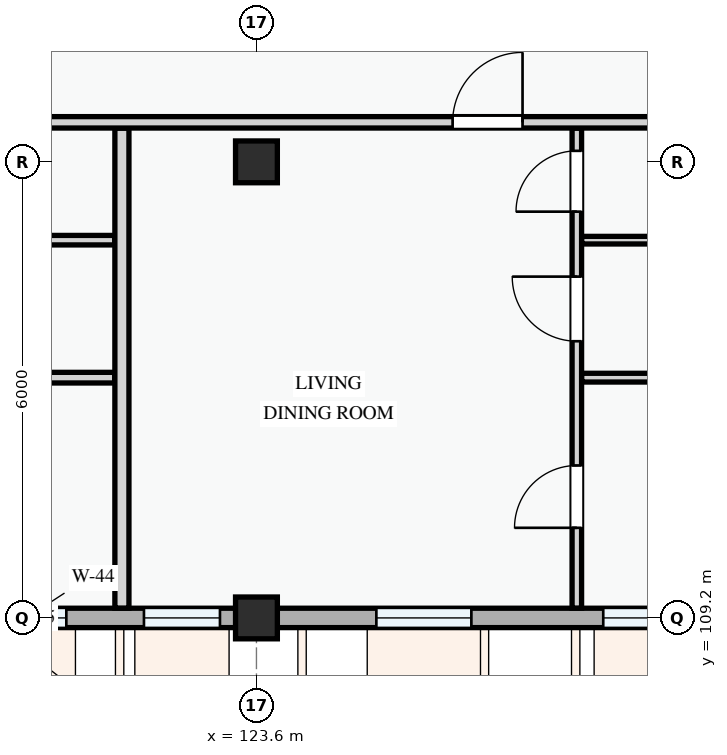
"""IFC4 building model, lengths in metres.
Left out: names, types, materials, properties, quantities, classifications, styles, units other than length and angle.
Written with IfcOpenShell. Run it as: python <this file> out.ifc"""

import sys

from ifc_helpers import new_model, si_unit, direction, frame, frame_2d, origin, origin_2d, place, context, subcontext, project, spatial, rectangle, extrude, element, fill, save


model = new_model("IFC4")
c1 = context("Model", 3, precision=1e-05, world=origin(), true_north=direction((0.0, 1.0)))
c2 = subcontext(c1, "Body", "Model", "MODEL_VIEW")
j1 = project(units=[si_unit("LENGTHUNIT", "METRE"), si_unit("PLANEANGLEUNIT", "RADIAN")], contexts=[c1])
p1 = place(None, origin())
s1 = spatial("IfcSite", under=j1, at=p1, CompositionType="ELEMENT")
p2 = place(p1, origin())
s2 = spatial("IfcBuilding", under=s1, at=p2, CompositionType="ELEMENT")
p3 = place(p2, frame((0.0, 0.0, 34.5)))
s3 = spatial("IfcBuildingStorey", under=s2, at=p3, CompositionType="ELEMENT", Elevation=34.5)
for number, where, z_axis, x_axis in (
    (1, (123.6, 109.2, 0.0), (0.0, 0.0, 1.0), (1.0, 0.0, 0.0)),
    (2, (123.6, 115.2, 0.0), (0.0, 0.0, 1.0), (1.0, 0.0, 0.0)),
):
    element("IfcColumn", number, at=place(p3, frame(where, z_axis=z_axis, x_axis=x_axis)), inside=s3, PredefinedType="COLUMN", context=c2, shape_type="SweptSolid", body=[
        extrude(rectangle(XDim=0.55, YDim=0.55, at=origin_2d()), origin(), (0.0, 0.0, 1.0), 3.3),
    ])
p4 = place(p3, frame((115.2, 109.2, 0.0), z_axis=(0.0, 0.0, 1.0), x_axis=(1.0, 0.0, 0.0)))
e3 = element("IfcWall", 3, at=p4, inside=s3, PredefinedType="STANDARD", context=c2, shape_type="SweptSolid", body=[
    extrude(rectangle(XDim=8.4, YDim=0.255, at=frame_2d((4.2, 0.0))), origin(), (0.0, 0.0, 1.0), 2.375),
])
p5 = place(p4, frame((0.518, 0.0, 0.78)))
e4 = element("IfcOpeningElement", 4, at=p5, cuts=e3, PredefinedType="OPENING", context=c2, shape_type="SweptSolid", body=[
    extrude(rectangle(XDim=0.9, YDim=1.2, at=frame_2d((0.45, 0.6))), frame((0.0, 0.137, 0.0), z_axis=(0.0, -1.0, 0.0), x_axis=(1.0, 0.0, 0.0)), (0.0, 0.0, 1.0), 0.275),
])
p6 = place(p4, frame((2.451, 0.0, 0.78)))
e5 = element("IfcOpeningElement", 5, at=p6, cuts=e3, PredefinedType="OPENING", context=c2, shape_type="SweptSolid", body=[
    extrude(rectangle(XDim=1.1, YDim=1.3, at=frame_2d((0.55, 0.65))), frame((0.0, 0.137, 0.0), z_axis=(0.0, -1.0, 0.0), x_axis=(1.0, 0.0, 0.0)), (0.0, 0.0, 1.0), 0.275),
])
p7 = place(p4, frame((4.849, 0.0, 0.78)))
e6 = element("IfcOpeningElement", 6, at=p7, cuts=e3, PredefinedType="OPENING", context=c2, shape_type="SweptSolid", body=[
    extrude(rectangle(XDim=1.05, YDim=1.2, at=frame_2d((0.525, 0.6))), frame((0.0, 0.137, 0.0), z_axis=(0.0, -1.0, 0.0), x_axis=(1.0, 0.0, 0.0)), (0.0, 0.0, 1.0), 0.275),
])
p8 = place(p4, frame((6.92, 0.0, 0.78)))
e7 = element("IfcOpeningElement", 7, at=p8, cuts=e3, PredefinedType="OPENING", context=c2, shape_type="SweptSolid", body=[
    extrude(rectangle(XDim=1.0, YDim=1.25, at=frame_2d((0.5, 0.625))), frame((0.0, 0.137, 0.0), z_axis=(0.0, -1.0, 0.0), x_axis=(1.0, 0.0, 0.0)), (0.0, 0.0, 1.0), 0.275),
])
p9 = place(p3, frame((123.6, 109.2, 0.0), z_axis=(0.0, 0.0, 1.0), x_axis=(1.0, 0.0, 0.0)))
e8 = element("IfcWall", 8, at=p9, inside=s3, PredefinedType="STANDARD", context=c2, shape_type="SweptSolid", body=[
    extrude(rectangle(XDim=6.0, YDim=0.255, at=frame_2d((3.0, 0.0))), origin(), (0.0, 0.0, 1.0), 2.525),
])
p10 = place(p9, frame((1.577, 0.0, 0.78)))
e9 = element("IfcOpeningElement", 9, at=p10, cuts=e8, PredefinedType="OPENING", context=c2, shape_type="SweptSolid", body=[
    extrude(rectangle(XDim=1.25, YDim=1.45, at=frame_2d((0.625, 0.725))), frame((0.0, 0.137, 0.0), z_axis=(0.0, -1.0, 0.0), x_axis=(1.0, 0.0, 0.0)), (0.0, 0.0, 1.0), 0.275),
])
p11 = place(p9, frame((4.562, 0.0, 0.78)))
e10 = element("IfcOpeningElement", 10, at=p11, cuts=e8, PredefinedType="OPENING", context=c2, shape_type="SweptSolid", body=[
    extrude(rectangle(XDim=0.9, YDim=1.2, at=frame_2d((0.45, 0.6))), frame((0.0, 0.137, 0.0), z_axis=(0.0, -1.0, 0.0), x_axis=(1.0, 0.0, 0.0)), (0.0, 0.0, 1.0), 0.275),
])
p12 = place(p3, frame((116.997, 112.361, 0.0), z_axis=(0.0, 0.0, 1.0), x_axis=(1.0, 0.0, 0.0)))
e11 = element("IfcWall", 11, at=p12, inside=s3, PredefinedType="PARTITIONING", context=c2, shape_type="SweptSolid", body=[
    extrude(rectangle(XDim=4.739, YDim=0.14, at=frame_2d((2.369, 0.0))), origin(), (0.0, 0.0, 1.0), 3.0),
])
p13 = place(p3, frame((116.997, 114.17, 0.0), z_axis=(0.0, 0.0, 1.0), x_axis=(1.0, 0.0, 0.0)))
e12 = element("IfcWall", 12, at=p13, inside=s3, PredefinedType="PARTITIONING", context=c2, shape_type="SweptSolid", body=[
    extrude(rectangle(XDim=4.739, YDim=0.125, at=frame_2d((2.369, 0.0))), origin(), (0.0, 0.0, 1.0), 3.0),
])
p14 = place(p3, frame((127.815, 109.33, 0.0), z_axis=(0.0, 0.0, 1.0), x_axis=(0.0, 1.0, 0.0)))
e13 = element("IfcWall", 13, at=p14, inside=s3, PredefinedType="PARTITIONING", context=c2, shape_type="SweptSolid", body=[
    extrude(rectangle(XDim=6.313, YDim=0.125, at=frame_2d((3.157, 0.0))), origin(), (0.0, 0.0, 1.0), 3.0),
])
p15 = place(p14, frame((1.056, 0.0, 0.0)))
e14 = element("IfcOpeningElement", 14, at=p15, cuts=e13, PredefinedType="OPENING", context=c2, shape_type="SweptSolid", body=[
    extrude(rectangle(XDim=0.82, YDim=2.08, at=frame_2d((0.41, 1.04))), frame((0.0, 0.073, 0.0), z_axis=(0.0, -1.0, 0.0), x_axis=(1.0, 0.0, 0.0)), (0.0, 0.0, 1.0), 0.145),
])
p16 = place(p14, frame((3.511, 0.0, 0.0)))
e15 = element("IfcOpeningElement", 15, at=p16, cuts=e13, PredefinedType="OPENING", context=c2, shape_type="SweptSolid", body=[
    extrude(rectangle(XDim=0.85, YDim=2.1, at=frame_2d((0.425, 1.05))), frame((0.0, 0.073, 0.0), z_axis=(0.0, -1.0, 0.0), x_axis=(1.0, 0.0, 0.0)), (0.0, 0.0, 1.0), 0.145),
])
p17 = place(p14, frame((5.215, 0.0, 0.0)))
e16 = element("IfcOpeningElement", 16, at=p17, cuts=e13, PredefinedType="OPENING", context=c2, shape_type="SweptSolid", body=[
    extrude(rectangle(XDim=0.8, YDim=2.1, at=frame_2d((0.4, 1.05))), frame((0.0, 0.073, 0.0), z_axis=(0.0, -1.0, 0.0), x_axis=(1.0, 0.0, 0.0)), (0.0, 0.0, 1.0), 0.145),
])
p18 = place(p3, frame((127.879, 112.361, 0.0), z_axis=(0.0, 0.0, 1.0), x_axis=(1.0, 0.0, 0.0)))
e17 = element("IfcWall", 17, at=p18, inside=s3, PredefinedType="PARTITIONING", context=c2, shape_type="SweptSolid", body=[
    extrude(rectangle(XDim=8.208, YDim=0.115, at=frame_2d((4.104, 0.0))), origin(), (0.0, 0.0, 1.0), 3.0),
])
p19 = place(p3, frame((127.879, 114.17, 0.0), z_axis=(0.0, 0.0, 1.0), x_axis=(1.0, 0.0, 0.0)))
e18 = element("IfcWall", 18, at=p19, inside=s3, PredefinedType="PARTITIONING", context=c2, shape_type="SweptSolid", body=[
    extrude(rectangle(XDim=8.208, YDim=0.1, at=frame_2d((4.104, 0.0))), origin(), (0.0, 0.0, 1.0), 3.0),
])
p20 = place(p3, frame((121.83, 109.33, 0.0), z_axis=(0.0, 0.0, 1.0), x_axis=(0.0, 1.0, 0.0)))
e19 = element("IfcWall", 19, at=p20, inside=s3, PredefinedType="PARTITIONING", context=c2, shape_type="SweptSolid", body=[
    extrude(rectangle(XDim=6.313, YDim=0.185, at=frame_2d((3.157, 0.0))), origin(), (0.0, 0.0, 1.0), 3.0),
])
p21 = place(p3, frame((109.33, 115.72, 0.0), z_axis=(0.0, 0.0, 1.0), x_axis=(1.0, 0.0, 0.0)))
e20 = element("IfcWall", 20, at=p21, inside=s3, PredefinedType="PARTITIONING", context=c2, shape_type="SweptSolid", body=[
    extrude(rectangle(XDim=40.72, YDim=0.15, at=frame_2d((20.36, 0.0))), origin(), (0.0, 0.0, 1.0), 3.0),
])
p22 = place(p21, frame((2.32, 0.0, 0.0)))
e21 = element("IfcOpeningElement", 21, at=p22, cuts=e20, PredefinedType="OPENING", context=c2, shape_type="SweptSolid", body=[
    extrude(rectangle(XDim=0.92, YDim=2.1, at=frame_2d((0.46, 1.05))), frame((0.0, 0.085, 0.0), z_axis=(0.0, -1.0, 0.0), x_axis=(1.0, 0.0, 0.0)), (0.0, 0.0, 1.0), 0.17),
])
p23 = place(p21, frame((16.851, 0.0, 0.0)))
e22 = element("IfcOpeningElement", 22, at=p23, cuts=e20, PredefinedType="OPENING", context=c2, shape_type="SweptSolid", body=[
    extrude(rectangle(XDim=0.92, YDim=2.1, at=frame_2d((0.46, 1.05))), frame((0.0, 0.085, 0.0), z_axis=(0.0, -1.0, 0.0), x_axis=(1.0, 0.0, 0.0)), (0.0, 0.0, 1.0), 0.17),
])
p24 = place(p21, frame((31.258, 0.0, 0.0)))
e23 = element("IfcOpeningElement", 23, at=p24, cuts=e20, PredefinedType="OPENING", context=c2, shape_type="SweptSolid", body=[
    extrude(rectangle(XDim=0.96, YDim=2.12, at=frame_2d((0.48, 1.06))), frame((0.0, 0.085, 0.0), z_axis=(0.0, -1.0, 0.0), x_axis=(1.0, 0.0, 0.0)), (0.0, 0.0, 1.0), 0.17),
])
p25 = place(p7, origin())
e24 = element("IfcWindow", 24, at=p25, inside=s3, PartitioningType="SINGLE_PANEL", PredefinedType="WINDOW", context=c2, shape_type="SweptSolid", body=[
    extrude(rectangle(XDim=1.05, YDim=1.2, at=frame_2d((0.525, 0.6))), frame((0.0, 0.03, 0.0), z_axis=(0.0, -1.0, 0.0), x_axis=(1.0, 0.0, 0.0)), (0.0, 0.0, 1.0), 0.06),
])
fill(e6, e24)
p26 = place(p8, origin())
e25 = element("IfcWindow", 25, at=p26, inside=s3, PartitioningType="SINGLE_PANEL", PredefinedType="WINDOW", context=c2, shape_type="SweptSolid", body=[
    extrude(rectangle(XDim=1.0, YDim=1.25, at=frame_2d((0.5, 0.625))), frame((0.0, 0.03, 0.0), z_axis=(0.0, -1.0, 0.0), x_axis=(1.0, 0.0, 0.0)), (0.0, 0.0, 1.0), 0.06),
])
fill(e7, e25)
p27 = place(p10, origin())
e26 = element("IfcWindow", 26, at=p27, inside=s3, PartitioningType="SINGLE_PANEL", PredefinedType="WINDOW", context=c2, shape_type="SweptSolid", body=[
    extrude(rectangle(XDim=1.25, YDim=1.45, at=frame_2d((0.625, 0.725))), frame((0.0, 0.03, 0.0), z_axis=(0.0, -1.0, 0.0), x_axis=(1.0, 0.0, 0.0)), (0.0, 0.0, 1.0), 0.06),
])
fill(e9, e26)
p28 = place(p11, origin())
e27 = element("IfcWindow", 27, at=p28, inside=s3, PartitioningType="SINGLE_PANEL", PredefinedType="WINDOW", context=c2, shape_type="SweptSolid", body=[
    extrude(rectangle(XDim=0.9, YDim=1.2, at=frame_2d((0.45, 0.6))), frame((0.0, 0.03, 0.0), z_axis=(0.0, -1.0, 0.0), x_axis=(1.0, 0.0, 0.0)), (0.0, 0.0, 1.0), 0.06),
])
fill(e10, e27)
p29 = place(p15, origin())
e28 = element("IfcDoor", 28, at=p29, inside=s3, OperationType="SINGLE_SWING_LEFT", PredefinedType="DOOR", context=c2, shape_type="SweptSolid", body=[
    extrude(rectangle(XDim=0.82, YDim=2.08, at=frame_2d((0.41, 1.04))), frame((0.0, 0.025, 0.0), z_axis=(0.0, -1.0, 0.0), x_axis=(1.0, 0.0, 0.0)), (0.0, 0.0, 1.0), 0.05),
])
fill(e14, e28)
p30 = place(p16, origin())
e29 = element("IfcDoor", 29, at=p30, inside=s3, OperationType="SINGLE_SWING_RIGHT", PredefinedType="DOOR", context=c2, shape_type="SweptSolid", body=[
    extrude(rectangle(XDim=0.85, YDim=2.1, at=frame_2d((0.425, 1.05))), frame((0.0, 0.025, 0.0), z_axis=(0.0, -1.0, 0.0), x_axis=(1.0, 0.0, 0.0)), (0.0, 0.0, 1.0), 0.05),
])
fill(e15, e29)
p31 = place(p17, origin())
e30 = element("IfcDoor", 30, at=p31, inside=s3, OperationType="SINGLE_SWING_LEFT", PredefinedType="DOOR", context=c2, shape_type="SweptSolid", body=[
    extrude(rectangle(XDim=0.8, YDim=2.1, at=frame_2d((0.4, 1.05))), frame((0.0, 0.025, 0.0), z_axis=(0.0, -1.0, 0.0), x_axis=(1.0, 0.0, 0.0)), (0.0, 0.0, 1.0), 0.05),
])
fill(e16, e30)
p32 = place(p23, origin())
e31 = element("IfcDoor", 31, at=p32, inside=s3, OperationType="SINGLE_SWING_RIGHT", PredefinedType="DOOR", context=c2, shape_type="SweptSolid", body=[
    extrude(rectangle(XDim=0.92, YDim=2.1, at=frame_2d((0.46, 1.05))), frame((0.0, 0.025, 0.0), z_axis=(0.0, -1.0, 0.0), x_axis=(1.0, 0.0, 0.0)), (0.0, 0.0, 1.0), 0.05),
])
fill(e22, e31)
save(model, sys.argv[1])
